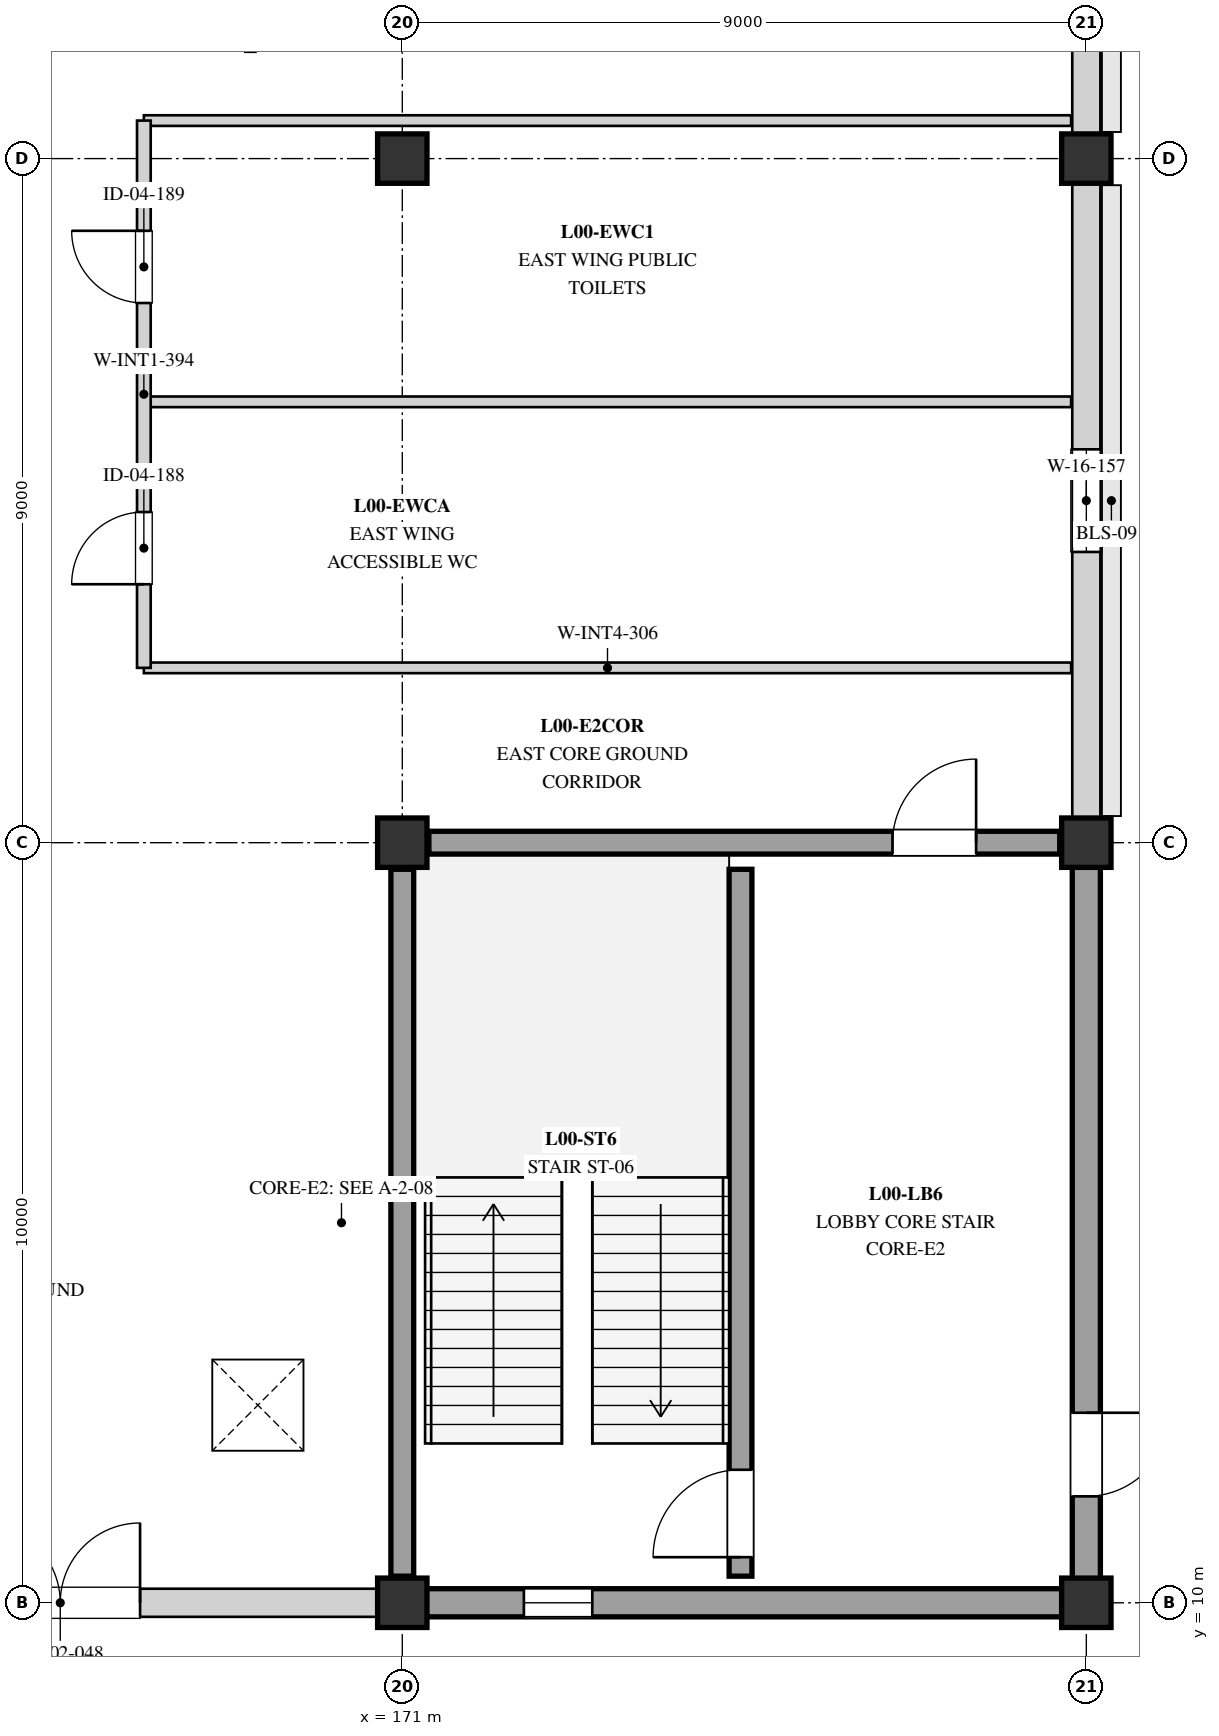
"""IFC4 building model, lengths in metres.
Left out: names, types, materials, properties, quantities, classifications, styles, units other than length and angle.
Written with IfcOpenShell. Run it as: python <this file> out.ifc"""

import sys

from ifc_helpers import new_model, si_unit, direction, frame, frame_2d, origin, origin_2d, place, context, subcontext, project, spatial, rectangle, extrude, element, fill, save


model = new_model("IFC4")
c1 = context("Model", 3, precision=1e-05, world=origin(), true_north=direction((0.0, 1.0)))
c2 = subcontext(c1, "Body", "Model", "MODEL_VIEW")
j1 = project(units=[si_unit("LENGTHUNIT", "METRE"), si_unit("PLANEANGLEUNIT", "RADIAN")], contexts=[c1])
p1 = place(None, origin())
s1 = spatial("IfcSite", under=j1, at=p1, CompositionType="ELEMENT")
p2 = place(p1, origin())
s2 = spatial("IfcBuilding", under=s1, at=p2, CompositionType="ELEMENT")
p3 = place(p2, origin())
s3 = spatial("IfcBuildingStorey", under=s2, at=p3, CompositionType="ELEMENT", Elevation=0.0)
for number, where, z_axis, x_axis in (
    (1, (171.0, 10.0, 0.0), (0.0, 0.0, 1.0), (1.0, 0.0, 0.0)),
    (2, (171.0, 20.0, 0.0), (0.0, 0.0, 1.0), (1.0, 0.0, 0.0)),
    (3, (171.0, 29.0, 0.0), (0.0, 0.0, 1.0), (1.0, 0.0, 0.0)),
    (4, (180.0, 10.0, 0.0), (0.0, 0.0, 1.0), (1.0, 0.0, 0.0)),
    (5, (180.0, 20.0, 0.0), (0.0, 0.0, 1.0), (1.0, 0.0, 0.0)),
    (6, (180.0, 29.0, 0.0), (0.0, 0.0, 1.0), (1.0, 0.0, 0.0)),
):
    element("IfcColumn", number, at=place(p3, frame(where, z_axis=z_axis, x_axis=x_axis)), inside=s3, PredefinedType="COLUMN", context=c2, shape_type="SweptSolid", body=[
        extrude(rectangle(XDim=0.65, YDim=0.65, at=origin_2d()), origin(), (0.0, 0.0, 1.0), 4.5),
    ])
p4 = place(p3, frame((180.0, 20.0, 0.0), z_axis=(0.0, 0.0, 1.0), x_axis=(0.0, -1.0, 0.0)))
e7 = element("IfcWall", 7, at=p4, inside=s3, PredefinedType="STANDARD", context=c2, shape_type="SweptSolid", body=[
    extrude(rectangle(XDim=10.0, YDim=0.37, at=frame_2d((5.0, 0.0))), origin(), (0.0, 0.0, 1.0), 4.25),
])
p5 = place(p4, frame((7.5, 0.0, 0.0)))
e8 = element("IfcOpeningElement", 8, at=p5, cuts=e7, PredefinedType="OPENING", context=c2, shape_type="SweptSolid", body=[
    extrude(rectangle(XDim=1.1, YDim=2.2, at=frame_2d((0.55, 1.1))), frame((0.0, 0.195, 0.0), z_axis=(0.0, -1.0, 0.0), x_axis=(1.0, 0.0, 0.0)), (0.0, 0.0, 1.0), 0.39),
])
p6 = place(p3, frame((180.0, 20.0, 0.0), z_axis=(0.0, 0.0, 1.0), x_axis=(0.0, 1.0, 0.0)))
e9 = element("IfcWall", 9, at=p6, inside=s3, PredefinedType="STANDARD", context=c2, shape_type="SweptSolid", body=[
    extrude(rectangle(XDim=9.0, YDim=0.37, at=frame_2d((4.5, 0.0))), origin(), (0.0, 0.0, 1.0), 3.38),
])
p7 = place(p6, frame((3.825, 0.0, 0.9)))
e10 = element("IfcOpeningElement", 10, at=p7, cuts=e9, PredefinedType="OPENING", context=c2, shape_type="SweptSolid", body=[
    extrude(rectangle(XDim=1.35, YDim=1.6, at=frame_2d((0.675, 0.8))), frame((0.0, 0.195, 0.0), z_axis=(0.0, -1.0, 0.0), x_axis=(1.0, 0.0, 0.0)), (0.0, 0.0, 1.0), 0.39),
])
p8 = place(p3, frame((180.0, 29.0, 0.0), z_axis=(0.0, 0.0, 1.0), x_axis=(0.0, 1.0, 0.0)))
e11 = element("IfcWall", 11, at=p8, inside=s3, PredefinedType="STANDARD", context=c2, shape_type="SweptSolid", body=[
    extrude(rectangle(XDim=9.0, YDim=0.37, at=frame_2d((4.5, 0.0))), origin(), (0.0, 0.0, 1.0), 3.38),
])
p9 = place(p8, frame((3.3, 0.0, 0.9)))
e12 = element("IfcOpeningElement", 12, at=p9, cuts=e11, PredefinedType="OPENING", context=c2, shape_type="SweptSolid", body=[
    extrude(rectangle(XDim=2.4, YDim=2.0, at=frame_2d((1.2, 1.0))), frame((0.0, 0.195, 0.0), z_axis=(0.0, -1.0, 0.0), x_axis=(1.0, 0.0, 0.0)), (0.0, 0.0, 1.0), 0.39),
])
p10 = place(p3, frame((162.0, 10.0, 0.0), z_axis=(0.0, 0.0, 1.0), x_axis=(1.0, 0.0, 0.0)))
e13 = element("IfcWall", 13, at=p10, inside=s3, PredefinedType="STANDARD", context=c2, shape_type="SweptSolid", body=[
    extrude(rectangle(XDim=9.0, YDim=0.37, at=frame_2d((4.5, 0.0))), origin(), (0.0, 0.0, 1.0), 3.38),
])
p11 = place(p10, frame((3.45, 0.0, 0.0)))
e14 = element("IfcOpeningElement", 14, at=p11, cuts=e13, PredefinedType="OPENING", context=c2, shape_type="SweptSolid", body=[
    extrude(rectangle(XDim=2.1, YDim=2.5, at=frame_2d((1.05, 1.25))), frame((0.0, 0.195, 0.0), z_axis=(0.0, -1.0, 0.0), x_axis=(1.0, 0.0, 0.0)), (0.0, 0.0, 1.0), 0.39),
])
p12 = place(p3, frame((171.0, 10.0, 0.0), z_axis=(0.0, 0.0, 1.0), x_axis=(1.0, 0.0, 0.0)))
e15 = element("IfcWall", 15, at=p12, inside=s3, PredefinedType="STANDARD", context=c2, shape_type="SweptSolid", body=[
    extrude(rectangle(XDim=9.0, YDim=0.37, at=frame_2d((4.5, 0.0))), origin(), (0.0, 0.0, 1.0), 4.25),
])
p13 = place(p12, frame((1.6, 0.0, 0.79)))
e16 = element("IfcOpeningElement", 16, at=p13, cuts=e15, PredefinedType="OPENING", context=c2, shape_type="SweptSolid", body=[
    extrude(rectangle(XDim=0.9, YDim=2.4, at=frame_2d((0.45, 1.2))), frame((0.0, 0.195, 0.0), z_axis=(0.0, -1.0, 0.0), x_axis=(1.0, 0.0, 0.0)), (0.0, 0.0, 1.0), 0.39),
])
p14 = place(p3, frame((175.45, 10.35, 0.0), z_axis=(0.0, 0.0, 1.0), x_axis=(0.0, 1.0, 0.0)))
e17 = element("IfcWall", 17, at=p14, inside=s3, PredefinedType="SHEAR", context=c2, shape_type="SweptSolid", body=[
    extrude(rectangle(XDim=9.3, YDim=0.3, at=frame_2d((4.65, 0.0))), origin(), (0.0, 0.0, 1.0), 4.22),
])
p15 = place(p14, frame((0.25, 0.0, 0.0)))
e18 = element("IfcOpeningElement", 18, at=p15, cuts=e17, PredefinedType="OPENING", context=c2, shape_type="SweptSolid", body=[
    extrude(rectangle(XDim=1.15, YDim=2.15, at=frame_2d((0.575, 1.075))), frame((0.0, 0.16, 0.0), z_axis=(0.0, -1.0, 0.0), x_axis=(1.0, 0.0, 0.0)), (0.0, 0.0, 1.0), 0.32),
])
p16 = place(p3, frame((171.0, 10.35, 0.0), z_axis=(0.0, 0.0, 1.0), x_axis=(0.0, 1.0, 0.0)))
e19 = element("IfcWall", 19, at=p16, inside=s3, PredefinedType="SHEAR", context=c2, shape_type="SweptSolid", body=[
    extrude(rectangle(XDim=9.3, YDim=0.3, at=frame_2d((4.65, 0.0))), origin(), (0.0, 0.0, 1.0), 4.22),
])
p17 = place(p3, frame((171.35, 20.0, 0.0), z_axis=(0.0, 0.0, 1.0), x_axis=(1.0, 0.0, 0.0)))
e20 = element("IfcWall", 20, at=p17, inside=s3, PredefinedType="SHEAR", context=c2, shape_type="SweptSolid", body=[
    extrude(rectangle(XDim=8.3, YDim=0.3, at=frame_2d((4.15, 0.0))), origin(), (0.0, 0.0, 1.0), 4.22),
])
p18 = place(p17, frame((6.1, 0.0, 0.0)))
e21 = element("IfcOpeningElement", 21, at=p18, cuts=e20, PredefinedType="OPENING", context=c2, shape_type="SweptSolid", body=[
    extrude(rectangle(XDim=1.1, YDim=2.1, at=frame_2d((0.55, 1.05))), frame((0.0, 0.16, 0.0), z_axis=(0.0, -1.0, 0.0), x_axis=(1.0, 0.0, 0.0)), (0.0, 0.0, 1.0), 0.32),
])
for number, where, z_axis, x_axis in (
    (22, (167.6, 22.3, 0.0), (0.0, 0.0, 1.0), (1.0, 0.0, 0.0)),
    (23, (167.6, 25.8, 0.0), (0.0, 0.0, 1.0), (1.0, 0.0, 0.0)),
    (24, (167.6, 29.5, 0.0), (0.0, 0.0, 1.0), (1.0, 0.0, 0.0)),
):
    element("IfcWall", number, at=place(p3, frame(where, z_axis=z_axis, x_axis=x_axis)), inside=s3, PredefinedType="PARTITIONING", context=c2, shape_type="SweptSolid", body=[
        extrude(rectangle(XDim=12.2, YDim=0.14, at=frame_2d((6.1, 0.0))), origin(), (0.0, 0.0, 1.0), 3.2),
    ])
p19 = place(p3, frame((167.6, 22.3, 0.0), z_axis=(0.0, 0.0, 1.0), x_axis=(0.0, 1.0, 0.0)))
e25 = element("IfcWall", 25, at=p19, inside=s3, PredefinedType="STANDARD", context=c2, shape_type="SweptSolid", body=[
    extrude(rectangle(XDim=7.2, YDim=0.18, at=frame_2d((3.6, 0.0))), origin(), (0.0, 0.0, 1.0), 3.2),
])
p20 = place(p19, frame((1.1, 0.0, 0.0)))
e26 = element("IfcOpeningElement", 26, at=p20, cuts=e25, PredefinedType="OPENING", context=c2, shape_type="SweptSolid", body=[
    extrude(rectangle(XDim=0.95, YDim=2.1, at=frame_2d((0.475, 1.05))), frame((0.0, 0.1, 0.0), z_axis=(0.0, -1.0, 0.0), x_axis=(1.0, 0.0, 0.0)), (0.0, 0.0, 1.0), 0.2),
])
p21 = place(p19, frame((4.8, 0.0, 0.0)))
e27 = element("IfcOpeningElement", 27, at=p21, cuts=e25, PredefinedType="OPENING", context=c2, shape_type="SweptSolid", body=[
    extrude(rectangle(XDim=0.95, YDim=2.1, at=frame_2d((0.475, 1.05))), frame((0.0, 0.1, 0.0), z_axis=(0.0, -1.0, 0.0), x_axis=(1.0, 0.0, 0.0)), (0.0, 0.0, 1.0), 0.2),
])
p22 = place(p5, origin())
e28 = element("IfcDoor", 28, at=p22, inside=s3, OperationType="SINGLE_SWING_LEFT", PredefinedType="DOOR", context=c2, shape_type="SweptSolid", body=[
    extrude(rectangle(XDim=1.1, YDim=2.2, at=frame_2d((0.55, 1.1))), frame((0.0, 0.025, 0.0), z_axis=(0.0, -1.0, 0.0), x_axis=(1.0, 0.0, 0.0)), (0.0, 0.0, 1.0), 0.05),
])
fill(e8, e28)
p23 = place(p7, origin())
e29 = element("IfcWindow", 29, at=p23, inside=s3, PartitioningType="SINGLE_PANEL", PredefinedType="WINDOW", context=c2, shape_type="SweptSolid", body=[
    extrude(rectangle(XDim=1.35, YDim=1.6, at=frame_2d((0.675, 0.8))), frame((0.0, 0.03, 0.0), z_axis=(0.0, -1.0, 0.0), x_axis=(1.0, 0.0, 0.0)), (0.0, 0.0, 1.0), 0.06),
])
fill(e10, e29)
p24 = place(p11, origin())
e30 = element("IfcDoor", 30, at=p24, inside=s3, OperationType="DOUBLE_DOOR_SINGLE_SWING", PredefinedType="DOOR", context=c2, shape_type="SweptSolid", body=[
    extrude(rectangle(XDim=2.1, YDim=2.5, at=frame_2d((1.05, 1.25))), frame((0.0, 0.025, 0.0), z_axis=(0.0, -1.0, 0.0), x_axis=(1.0, 0.0, 0.0)), (0.0, 0.0, 1.0), 0.05),
])
fill(e14, e30)
p25 = place(p13, origin())
e31 = element("IfcWindow", 31, at=p25, inside=s3, PartitioningType="SINGLE_PANEL", PredefinedType="WINDOW", context=c2, shape_type="SweptSolid", body=[
    extrude(rectangle(XDim=0.9, YDim=2.4, at=frame_2d((0.45, 1.2))), frame((0.0, 0.03, 0.0), z_axis=(0.0, -1.0, 0.0), x_axis=(1.0, 0.0, 0.0)), (0.0, 0.0, 1.0), 0.06),
])
fill(e16, e31)
p26 = place(p15, origin())
e32 = element("IfcDoor", 32, at=p26, inside=s3, OperationType="SINGLE_SWING_LEFT", PredefinedType="DOOR", context=c2, shape_type="SweptSolid", body=[
    extrude(rectangle(XDim=1.15, YDim=2.15, at=frame_2d((0.575, 1.075))), frame((0.0, 0.025, 0.0), z_axis=(0.0, -1.0, 0.0), x_axis=(1.0, 0.0, 0.0)), (0.0, 0.0, 1.0), 0.05),
])
fill(e18, e32)
p27 = place(p18, origin())
e33 = element("IfcDoor", 33, at=p27, inside=s3, OperationType="SINGLE_SWING_RIGHT", PredefinedType="DOOR", context=c2, shape_type="SweptSolid", body=[
    extrude(rectangle(XDim=1.1, YDim=2.1, at=frame_2d((0.55, 1.05))), frame((0.0, 0.025, 0.0), z_axis=(0.0, -1.0, 0.0), x_axis=(1.0, 0.0, 0.0)), (0.0, 0.0, 1.0), 0.05),
])
fill(e21, e33)
p28 = place(p20, origin())
e34 = element("IfcDoor", 34, at=p28, inside=s3, OperationType="SINGLE_SWING_LEFT", PredefinedType="DOOR", context=c2, shape_type="SweptSolid", body=[
    extrude(rectangle(XDim=0.95, YDim=2.1, at=frame_2d((0.475, 1.05))), frame((0.0, 0.025, 0.0), z_axis=(0.0, -1.0, 0.0), x_axis=(1.0, 0.0, 0.0)), (0.0, 0.0, 1.0), 0.05),
])
fill(e26, e34)
p29 = place(p21, origin())
e35 = element("IfcDoor", 35, at=p29, inside=s3, OperationType="SINGLE_SWING_RIGHT", PredefinedType="DOOR", context=c2, shape_type="SweptSolid", body=[
    extrude(rectangle(XDim=0.95, YDim=2.1, at=frame_2d((0.475, 1.05))), frame((0.0, 0.025, 0.0), z_axis=(0.0, -1.0, 0.0), x_axis=(1.0, 0.0, 0.0)), (0.0, 0.0, 1.0), 0.05),
])
fill(e27, e35)
save(model, sys.argv[1])
